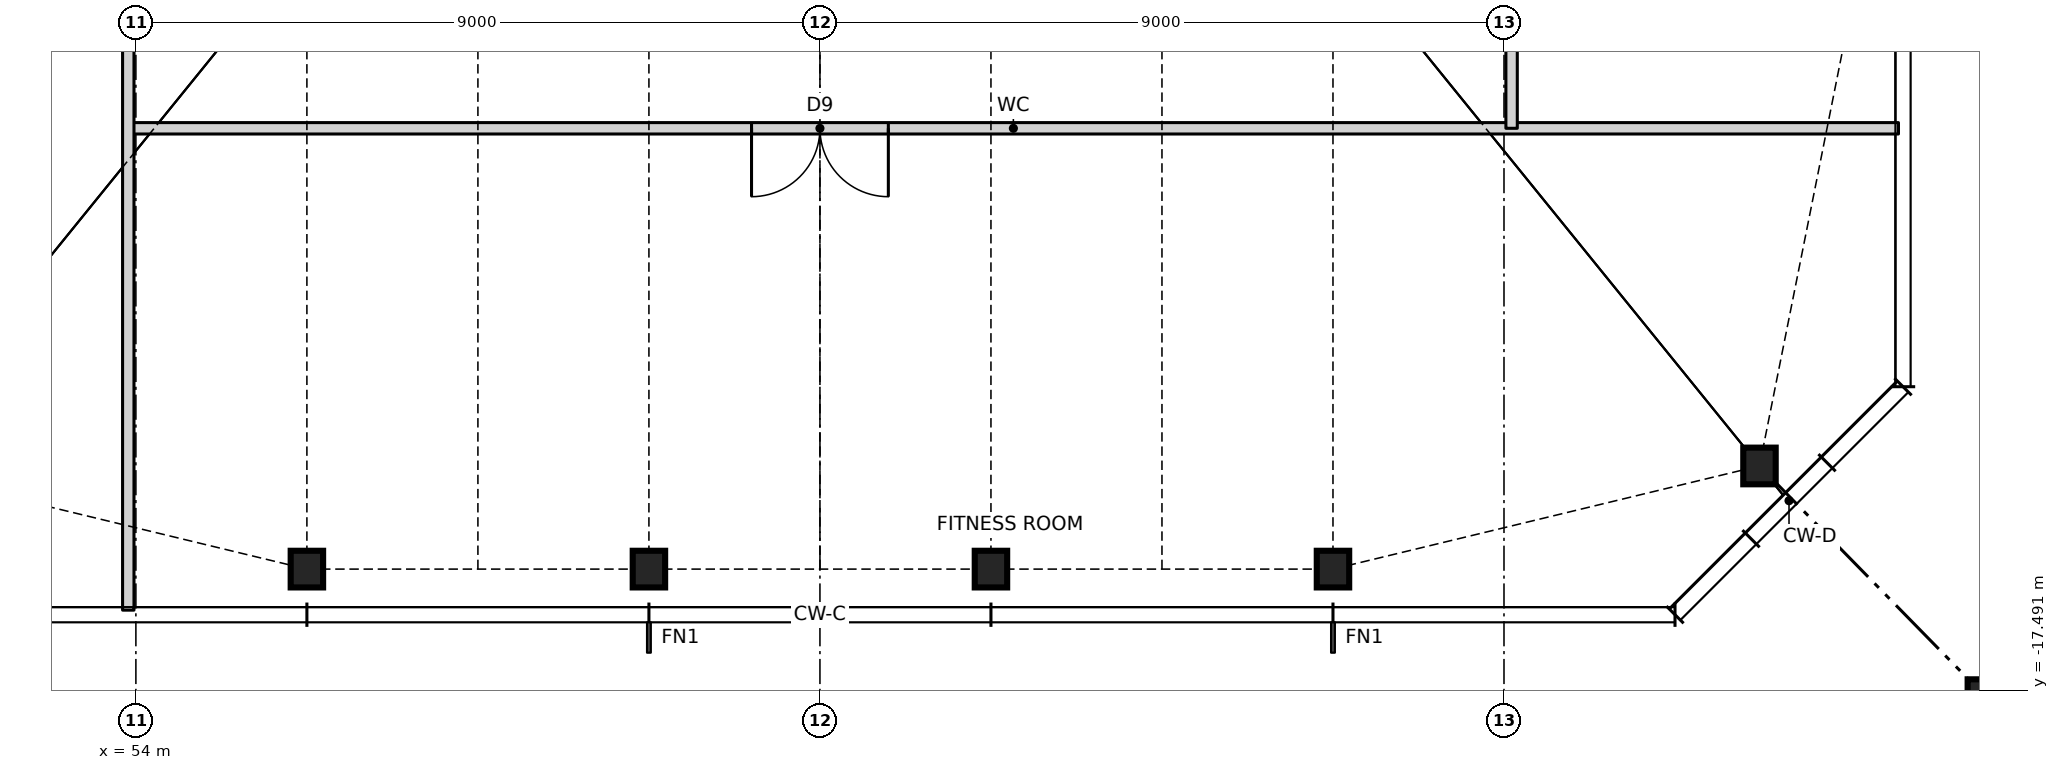
"""IFC4 building model, lengths in metres.
Left out: names, types, materials, properties, quantities, classifications, styles, units other than length and angle.
Written with IfcOpenShell. Run it as: python <this file> out.ifc"""

import sys

from ifc_helpers import new_model, si_unit, direction, frame, frame_2d, origin, origin_2d, place, context, subcontext, project, spatial, rectangle, hollow_rectangle, i_section, extrude, element, fill, save


model = new_model("IFC4")
c1 = context("Model", 3, precision=1e-05, world=origin(), true_north=direction((0.0, 1.0)))
c2 = subcontext(c1, "Body", "Model", "MODEL_VIEW")
j1 = project(units=[si_unit("LENGTHUNIT", "METRE"), si_unit("PLANEANGLEUNIT", "RADIAN")], contexts=[c1])
p1 = place(None, origin())
s1 = spatial("IfcSite", under=j1, at=p1, CompositionType="ELEMENT")
p2 = place(p1, origin())
s2 = spatial("IfcBuilding", under=s1, at=p2, CompositionType="ELEMENT")
p3 = place(p2, frame((0.0, 0.0, 98.0)))
s3 = spatial("IfcBuildingStorey", under=s2, at=p3, CompositionType="ELEMENT", Elevation=98.0)
for number, where, z_axis, x_axis in (
    (1, (56.25, -15.9, 0.0), (0.0, 0.0, 1.0), (1.0, 0.0, 0.0)),
    (2, (60.75, -15.9, 0.0), (0.0, 0.0, 1.0), (1.0, 0.0, 0.0)),
    (3, (65.25, -15.9, 0.0), (0.0, 0.0, 1.0), (1.0, 0.0, 0.0)),
    (4, (69.75, -15.9, 0.0), (0.0, 0.0, 1.0), (1.0, 0.0, 0.0)),
    (5, (75.361, -14.543, 0.0), (0.0, 0.0, 1.0), (1.0, 0.0, 0.0)),
):
    element("IfcColumn", number, at=place(p3, frame(where, z_axis=z_axis, x_axis=x_axis)), inside=s3, PredefinedType="COLUMN", context=c2, shape_type="SweptSolid", body=[
        extrude(i_section(OverallWidth=0.427, OverallDepth=0.483, WebThickness=0.051, FlangeThickness=0.082, at=origin_2d()), origin(), (0.0, 0.0, 1.0), 3.5),
    ])
p4 = place(p3, frame((78.65, -17.9, 0.0), z_axis=(0.0, 0.0, 1.0), x_axis=(1.0, 0.0, 0.0)))
e6 = element("IfcColumn", 6, at=p4, inside=s3, PredefinedType="COLUMN", context=c2, shape_type="SweptSolid", body=[
    extrude(hollow_rectangle(XDim=1.1, YDim=1.1, WallThickness=0.06, at=origin_2d()), origin(), (0.0, 0.0, 1.0), 3.5),
])
p5 = place(p3, frame((53.9, -10.1, 0.0), z_axis=(0.0, 0.0, 1.0), x_axis=(1.0, 0.0, 0.0)))
e7 = element("IfcWall", 7, at=p5, inside=s3, PredefinedType="PARTITIONING", context=c2, shape_type="SweptSolid", body=[
    extrude(rectangle(XDim=23.29, YDim=0.15, at=frame_2d((11.645, 0.0))), origin(), (0.0, 0.0, 1.0), 3.27),
])
p6 = place(p5, frame((8.2, 0.0, 0.0)))
e8 = element("IfcOpeningElement", 8, at=p6, cuts=e7, PredefinedType="OPENING", context=c2, shape_type="SweptSolid", body=[
    extrude(rectangle(XDim=1.8, YDim=2.1, at=frame_2d((0.9, 1.05))), frame((0.0, 0.085, 0.0), z_axis=(0.0, -1.0, 0.0), x_axis=(1.0, 0.0, 0.0)), (0.0, 0.0, 1.0), 0.17),
])
p7 = place(p3, frame((72.1, -10.1, 0.0), z_axis=(0.0, 0.0, 1.0), x_axis=(0.0, 1.0, 0.0)))
e9 = element("IfcWall", 9, at=p7, inside=s3, PredefinedType="PARTITIONING", context=c2, shape_type="SweptSolid", body=[
    extrude(rectangle(XDim=26.54, YDim=0.15, at=frame_2d((13.27, 0.0))), origin(), (0.0, 0.0, 1.0), 3.27),
])
p8 = place(p7, frame((1.15, 0.0, 0.0)))
e10 = element("IfcOpeningElement", 10, at=p8, cuts=e9, PredefinedType="OPENING", context=c2, shape_type="SweptSolid", body=[
    extrude(rectangle(XDim=0.9, YDim=2.1, at=frame_2d((0.45, 1.05))), frame((0.0, 0.085, 0.0), z_axis=(0.0, -1.0, 0.0), x_axis=(1.0, 0.0, 0.0)), (0.0, 0.0, 1.0), 0.17),
])
p9 = place(p7, frame((4.25, 0.0, 0.0)))
e11 = element("IfcOpeningElement", 11, at=p9, cuts=e9, PredefinedType="OPENING", context=c2, shape_type="SweptSolid", body=[
    extrude(rectangle(XDim=0.9, YDim=2.1, at=frame_2d((0.45, 1.05))), frame((0.0, 0.085, 0.0), z_axis=(0.0, -1.0, 0.0), x_axis=(1.0, 0.0, 0.0)), (0.0, 0.0, 1.0), 0.17),
])
p10 = place(p7, frame((6.95, 0.0, 0.0)))
e12 = element("IfcOpeningElement", 12, at=p10, cuts=e9, PredefinedType="OPENING", context=c2, shape_type="SweptSolid", body=[
    extrude(rectangle(XDim=0.9, YDim=2.1, at=frame_2d((0.45, 1.05))), frame((0.0, 0.085, 0.0), z_axis=(0.0, -1.0, 0.0), x_axis=(1.0, 0.0, 0.0)), (0.0, 0.0, 1.0), 0.17),
])
p11 = place(p7, frame((13.5, 0.0, 0.0)))
e13 = element("IfcOpeningElement", 13, at=p11, cuts=e9, PredefinedType="OPENING", context=c2, shape_type="SweptSolid", body=[
    extrude(rectangle(XDim=1.8, YDim=2.1, at=frame_2d((0.9, 1.05))), frame((0.0, 0.085, 0.0), z_axis=(0.0, -1.0, 0.0), x_axis=(1.0, 0.0, 0.0)), (0.0, 0.0, 1.0), 0.17),
])
p12 = place(p3, frame((53.9, -16.44, 0.0), z_axis=(0.0, 0.0, 1.0), x_axis=(0.0, 1.0, 0.0)))
e14 = element("IfcWall", 14, at=p12, inside=s3, PredefinedType="PARTITIONING", context=c2, shape_type="SweptSolid", body=[
    extrude(rectangle(XDim=26.54, YDim=0.15, at=frame_2d((13.27, 0.0))), origin(), (0.0, 0.0, 1.0), 3.27),
])
p13 = place(p12, frame((15.54, 0.0, 0.0)))
e15 = element("IfcOpeningElement", 15, at=p13, cuts=e14, PredefinedType="OPENING", context=c2, shape_type="SweptSolid", body=[
    extrude(rectangle(XDim=1.8, YDim=2.1, at=frame_2d((0.9, 1.05))), frame((0.0, 0.085, 0.0), z_axis=(0.0, -1.0, 0.0), x_axis=(1.0, 0.0, 0.0)), (0.0, 0.0, 1.0), 0.17),
])
p14 = place(p6, frame((1.8, 0.0, 0.0), z_axis=(0.0, 0.0, 1.0), x_axis=(-1.0, 0.0, 0.0)))
e16 = element("IfcDoor", 16, at=p14, inside=s3, OperationType="DOUBLE_DOOR_SINGLE_SWING", PredefinedType="DOOR", context=c2, shape_type="SweptSolid", body=[
    extrude(rectangle(XDim=1.8, YDim=2.1, at=frame_2d((0.9, 1.05))), frame((0.0, 0.025, 0.0), z_axis=(0.0, -1.0, 0.0), x_axis=(1.0, 0.0, 0.0)), (0.0, 0.0, 1.0), 0.05),
])
fill(e8, e16)
save(model, sys.argv[1])
